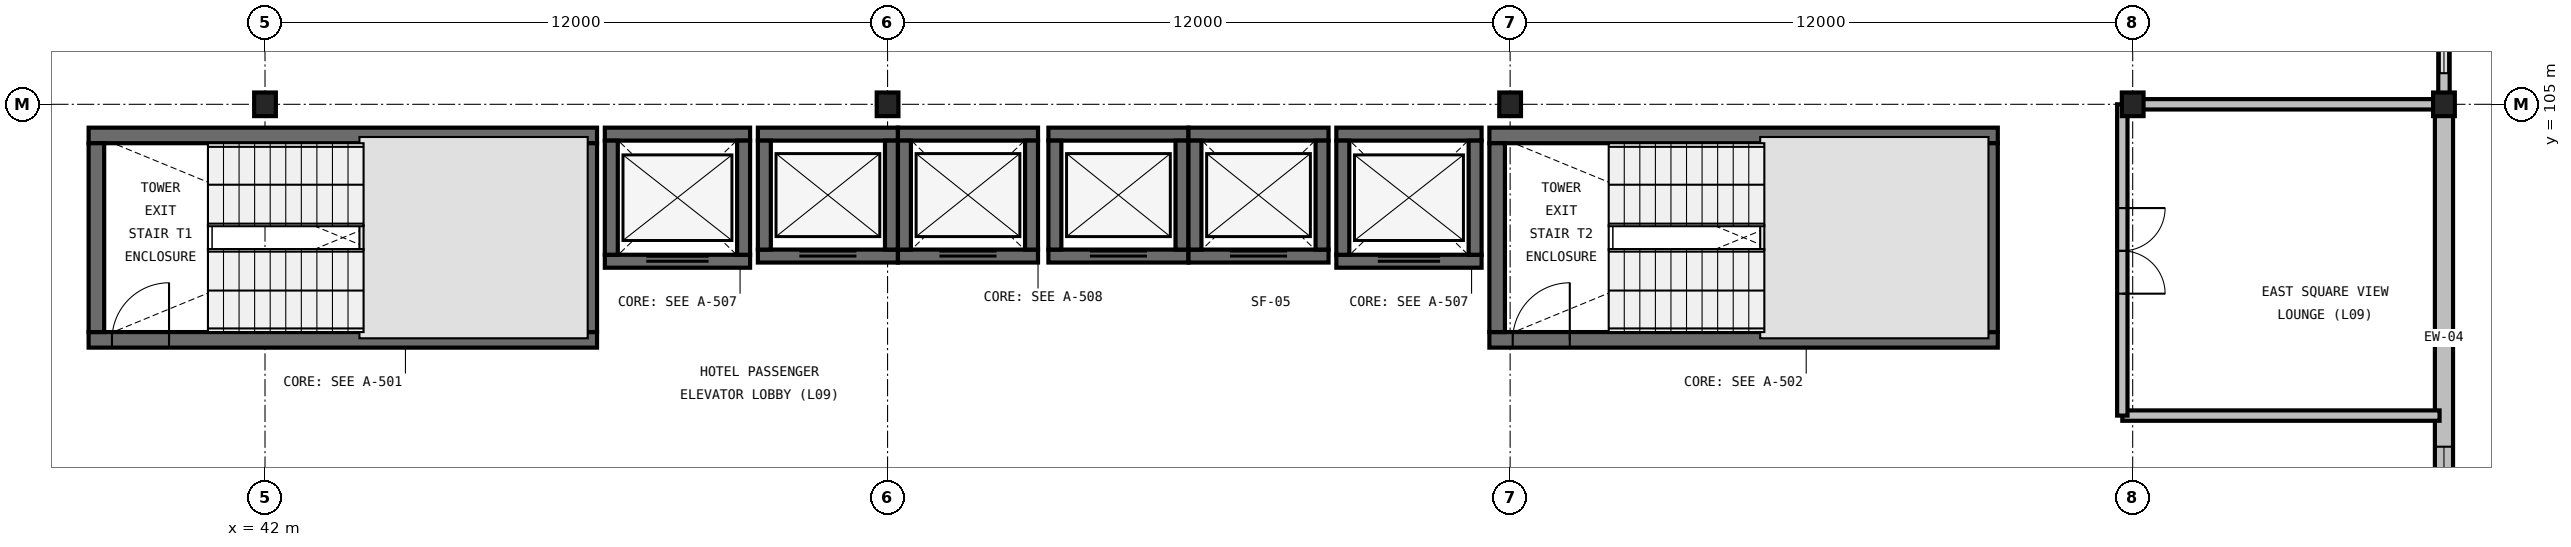
"""IFC4 building model, lengths in metres.
Left out: names, types, materials, properties, quantities, classifications, styles, units other than length and angle.
Written with IfcOpenShell. Run it as: python <this file> out.ifc"""

import sys

from ifc_helpers import new_model, si_unit, direction, frame, frame_2d, origin, origin_2d, place, context, subcontext, project, spatial, rectangle, i_section, extrude, element, fill, save


model = new_model("IFC4")
c1 = context("Model", 3, precision=1e-05, world=origin(), true_north=direction((0.0, 1.0)))
c2 = subcontext(c1, "Body", "Model", "MODEL_VIEW")
j1 = project(units=[si_unit("LENGTHUNIT", "METRE"), si_unit("PLANEANGLEUNIT", "RADIAN")], contexts=[c1])
p1 = place(None, origin())
s1 = spatial("IfcSite", under=j1, at=p1, CompositionType="ELEMENT")
p2 = place(p1, origin())
s2 = spatial("IfcBuilding", under=s1, at=p2, CompositionType="ELEMENT")
p3 = place(p2, frame((0.0, 0.0, 42.0)))
s3 = spatial("IfcBuildingStorey", under=s2, at=p3, CompositionType="ELEMENT", Elevation=42.0)
for number, where, z_axis, x_axis in (
    (1, (42.0, 105.0, 0.0), (0.0, 0.0, 1.0), (1.0, 0.0, 0.0)),
    (2, (54.0, 105.0, 0.0), (0.0, 0.0, 1.0), (1.0, 0.0, 0.0)),
    (3, (66.0, 105.0, 0.0), (0.0, 0.0, 1.0), (1.0, 0.0, 0.0)),
    (4, (78.0, 105.0, 0.0), (0.0, 0.0, 1.0), (1.0, 0.0, 0.0)),
    (5, (84.0, 105.0, 0.0), (0.0, 0.0, 1.0), (1.0, 0.0, 0.0)),
):
    element("IfcColumn", number, at=place(p3, frame(where, z_axis=z_axis, x_axis=x_axis)), inside=s3, PredefinedType="COLUMN", context=c2, shape_type="SweptSolid", body=[
        extrude(i_section(OverallWidth=0.419, OverallDepth=0.455, WebThickness=0.042, FlangeThickness=0.068, FilletRadius=0.031, at=origin_2d()), origin(), (0.0, 0.0, 1.0), 3.6),
    ])
p4 = place(p3, frame((38.6, 100.46, 0.0), z_axis=(0.0, 0.0, 1.0), x_axis=(1.0, 0.0, 0.0)))
e6 = element("IfcWall", 6, at=p4, inside=s3, PredefinedType="SHEAR", context=c2, shape_type="SweptSolid", body=[
    extrude(rectangle(XDim=9.8, YDim=0.3, at=frame_2d((4.9, 0.0))), origin(), (0.0, 0.0, 1.0), 3.6),
])
p5 = place(p4, frame((0.45, 0.0, 0.0)))
e7 = element("IfcOpeningElement", 7, at=p5, cuts=e6, PredefinedType="OPENING", context=c2, shape_type="SweptSolid", body=[
    extrude(rectangle(XDim=1.1, YDim=2.2, at=frame_2d((0.55, 1.1))), frame((0.0, 0.165, 0.0), z_axis=(0.0, -1.0, 0.0), x_axis=(1.0, 0.0, 0.0)), (0.0, 0.0, 1.0), 0.33),
])
p6 = place(p3, frame((48.4, 104.4, 0.0), z_axis=(0.0, 0.0, 1.0), x_axis=(-1.0, 0.0, 0.0)))
e8 = element("IfcWall", 8, at=p6, inside=s3, PredefinedType="SHEAR", context=c2, shape_type="SweptSolid", body=[
    extrude(rectangle(XDim=9.8, YDim=0.3, at=frame_2d((4.9, 0.0))), origin(), (0.0, 0.0, 1.0), 3.6),
])
for number, where, z_axis, x_axis in (
    (9, (38.75, 104.25, 0.0), (0.0, 0.0, 1.0), (0.0, -1.0, 0.0)),
    (10, (48.25, 100.61, 0.0), (0.0, 0.0, 1.0), (0.0, 1.0, 0.0)),
):
    element("IfcWall", number, at=place(p3, frame(where, z_axis=z_axis, x_axis=x_axis)), inside=s3, PredefinedType="SHEAR", context=c2, shape_type="SweptSolid", body=[
        extrude(rectangle(XDim=3.64, YDim=0.3, at=frame_2d((1.82, 0.0))), origin(), (0.0, 0.0, 1.0), 3.6),
    ])
p7 = place(p3, frame((65.6, 100.46, 0.0), z_axis=(0.0, 0.0, 1.0), x_axis=(1.0, 0.0, 0.0)))
e11 = element("IfcWall", 11, at=p7, inside=s3, PredefinedType="SHEAR", context=c2, shape_type="SweptSolid", body=[
    extrude(rectangle(XDim=9.8, YDim=0.3, at=frame_2d((4.9, 0.0))), origin(), (0.0, 0.0, 1.0), 3.6),
])
p8 = place(p7, frame((0.45, 0.0, 0.0)))
e12 = element("IfcOpeningElement", 12, at=p8, cuts=e11, PredefinedType="OPENING", context=c2, shape_type="SweptSolid", body=[
    extrude(rectangle(XDim=1.1, YDim=2.2, at=frame_2d((0.55, 1.1))), frame((0.0, 0.165, 0.0), z_axis=(0.0, -1.0, 0.0), x_axis=(1.0, 0.0, 0.0)), (0.0, 0.0, 1.0), 0.33),
])
p9 = place(p3, frame((75.4, 104.4, 0.0), z_axis=(0.0, 0.0, 1.0), x_axis=(-1.0, 0.0, 0.0)))
e13 = element("IfcWall", 13, at=p9, inside=s3, PredefinedType="SHEAR", context=c2, shape_type="SweptSolid", body=[
    extrude(rectangle(XDim=9.8, YDim=0.3, at=frame_2d((4.9, 0.0))), origin(), (0.0, 0.0, 1.0), 3.6),
])
for number, where, z_axis, x_axis in (
    (14, (65.75, 104.25, 0.0), (0.0, 0.0, 1.0), (0.0, -1.0, 0.0)),
    (15, (75.25, 100.61, 0.0), (0.0, 0.0, 1.0), (0.0, 1.0, 0.0)),
):
    element("IfcWall", number, at=place(p3, frame(where, z_axis=z_axis, x_axis=x_axis)), inside=s3, PredefinedType="SHEAR", context=c2, shape_type="SweptSolid", body=[
        extrude(rectangle(XDim=3.64, YDim=0.3, at=frame_2d((1.82, 0.0))), origin(), (0.0, 0.0, 1.0), 3.6),
    ])
p10 = place(p3, frame((48.55, 101.975, 0.0), z_axis=(0.0, 0.0, 1.0), x_axis=(1.0, 0.0, 0.0)))
e16 = element("IfcWall", 16, at=p10, inside=s3, PredefinedType="SHEAR", context=c2, shape_type="SweptSolid", body=[
    extrude(rectangle(XDim=2.8, YDim=0.25, at=frame_2d((1.4, 0.0))), origin(), (0.0, 0.0, 1.0), 3.6),
])
p11 = place(p10, frame((0.8, 0.0, 0.0)))
e17 = element("IfcOpeningElement", 17, at=p11, cuts=e16, PredefinedType="OPENING", context=c2, shape_type="SweptSolid", body=[
    extrude(rectangle(XDim=1.2, YDim=2.2, at=frame_2d((0.6, 1.1))), frame((0.0, 0.14, 0.0), z_axis=(0.0, -1.0, 0.0), x_axis=(1.0, 0.0, 0.0)), (0.0, 0.0, 1.0), 0.28),
])
p12 = place(p3, frame((51.35, 104.425, 0.0), z_axis=(0.0, 0.0, 1.0), x_axis=(-1.0, 0.0, 0.0)))
e18 = element("IfcWall", 18, at=p12, inside=s3, PredefinedType="SHEAR", context=c2, shape_type="SweptSolid", body=[
    extrude(rectangle(XDim=2.8, YDim=0.25, at=frame_2d((1.4, 0.0))), origin(), (0.0, 0.0, 1.0), 3.6),
])
for number, where, z_axis, x_axis in (
    (19, (48.675, 104.3, 0.0), (0.0, 0.0, 1.0), (0.0, -1.0, 0.0)),
    (20, (51.225, 102.1, 0.0), (0.0, 0.0, 1.0), (0.0, 1.0, 0.0)),
):
    element("IfcWall", number, at=place(p3, frame(where, z_axis=z_axis, x_axis=x_axis)), inside=s3, PredefinedType="SHEAR", context=c2, shape_type="SweptSolid", body=[
        extrude(rectangle(XDim=2.2, YDim=0.25, at=frame_2d((1.1, 0.0))), origin(), (0.0, 0.0, 1.0), 3.6),
    ])
p13 = place(p3, frame((62.65, 101.975, 0.0), z_axis=(0.0, 0.0, 1.0), x_axis=(1.0, 0.0, 0.0)))
e21 = element("IfcWall", 21, at=p13, inside=s3, PredefinedType="SHEAR", context=c2, shape_type="SweptSolid", body=[
    extrude(rectangle(XDim=2.8, YDim=0.25, at=frame_2d((1.4, 0.0))), origin(), (0.0, 0.0, 1.0), 3.6),
])
p14 = place(p13, frame((0.8, 0.0, 0.0)))
e22 = element("IfcOpeningElement", 22, at=p14, cuts=e21, PredefinedType="OPENING", context=c2, shape_type="SweptSolid", body=[
    extrude(rectangle(XDim=1.2, YDim=2.2, at=frame_2d((0.6, 1.1))), frame((0.0, 0.14, 0.0), z_axis=(0.0, -1.0, 0.0), x_axis=(1.0, 0.0, 0.0)), (0.0, 0.0, 1.0), 0.28),
])
p15 = place(p3, frame((65.45, 104.425, 0.0), z_axis=(0.0, 0.0, 1.0), x_axis=(-1.0, 0.0, 0.0)))
e23 = element("IfcWall", 23, at=p15, inside=s3, PredefinedType="SHEAR", context=c2, shape_type="SweptSolid", body=[
    extrude(rectangle(XDim=2.8, YDim=0.25, at=frame_2d((1.4, 0.0))), origin(), (0.0, 0.0, 1.0), 3.6),
])
for number, where, z_axis, x_axis in (
    (24, (62.775, 104.3, 0.0), (0.0, 0.0, 1.0), (0.0, -1.0, 0.0)),
    (25, (65.325, 102.1, 0.0), (0.0, 0.0, 1.0), (0.0, 1.0, 0.0)),
):
    element("IfcWall", number, at=place(p3, frame(where, z_axis=z_axis, x_axis=x_axis)), inside=s3, PredefinedType="SHEAR", context=c2, shape_type="SweptSolid", body=[
        extrude(rectangle(XDim=2.2, YDim=0.25, at=frame_2d((1.1, 0.0))), origin(), (0.0, 0.0, 1.0), 3.6),
    ])
p16 = place(p3, frame((51.5, 102.075, 0.0), z_axis=(0.0, 0.0, 1.0), x_axis=(1.0, 0.0, 0.0)))
e26 = element("IfcWall", 26, at=p16, inside=s3, PredefinedType="SHEAR", context=c2, shape_type="SweptSolid", body=[
    extrude(rectangle(XDim=2.7, YDim=0.25, at=frame_2d((1.35, 0.0))), origin(), (0.0, 0.0, 1.0), 3.6),
])
p17 = place(p16, frame((0.8, 0.0, 0.0)))
e27 = element("IfcOpeningElement", 27, at=p17, cuts=e26, PredefinedType="OPENING", context=c2, shape_type="SweptSolid", body=[
    extrude(rectangle(XDim=1.1, YDim=2.2, at=frame_2d((0.55, 1.1))), frame((0.0, 0.14, 0.0), z_axis=(0.0, -1.0, 0.0), x_axis=(1.0, 0.0, 0.0)), (0.0, 0.0, 1.0), 0.28),
])
p18 = place(p3, frame((54.2, 104.425, 0.0), z_axis=(0.0, 0.0, 1.0), x_axis=(-1.0, 0.0, 0.0)))
e28 = element("IfcWall", 28, at=p18, inside=s3, PredefinedType="SHEAR", context=c2, shape_type="SweptSolid", body=[
    extrude(rectangle(XDim=2.7, YDim=0.25, at=frame_2d((1.35, 0.0))), origin(), (0.0, 0.0, 1.0), 3.6),
])
for number, where, z_axis, x_axis in (
    (29, (51.625, 104.3, 0.0), (0.0, 0.0, 1.0), (0.0, -1.0, 0.0)),
    (30, (54.075, 102.2, 0.0), (0.0, 0.0, 1.0), (0.0, 1.0, 0.0)),
):
    element("IfcWall", number, at=place(p3, frame(where, z_axis=z_axis, x_axis=x_axis)), inside=s3, PredefinedType="SHEAR", context=c2, shape_type="SweptSolid", body=[
        extrude(rectangle(XDim=2.1, YDim=0.25, at=frame_2d((1.05, 0.0))), origin(), (0.0, 0.0, 1.0), 3.6),
    ])
p19 = place(p3, frame((54.2, 102.075, 0.0), z_axis=(0.0, 0.0, 1.0), x_axis=(1.0, 0.0, 0.0)))
e31 = element("IfcWall", 31, at=p19, inside=s3, PredefinedType="SHEAR", context=c2, shape_type="SweptSolid", body=[
    extrude(rectangle(XDim=2.7, YDim=0.25, at=frame_2d((1.35, 0.0))), origin(), (0.0, 0.0, 1.0), 3.6),
])
p20 = place(p19, frame((0.8, 0.0, 0.0)))
e32 = element("IfcOpeningElement", 32, at=p20, cuts=e31, PredefinedType="OPENING", context=c2, shape_type="SweptSolid", body=[
    extrude(rectangle(XDim=1.1, YDim=2.2, at=frame_2d((0.55, 1.1))), frame((0.0, 0.14, 0.0), z_axis=(0.0, -1.0, 0.0), x_axis=(1.0, 0.0, 0.0)), (0.0, 0.0, 1.0), 0.28),
])
p21 = place(p3, frame((56.9, 104.425, 0.0), z_axis=(0.0, 0.0, 1.0), x_axis=(-1.0, 0.0, 0.0)))
e33 = element("IfcWall", 33, at=p21, inside=s3, PredefinedType="SHEAR", context=c2, shape_type="SweptSolid", body=[
    extrude(rectangle(XDim=2.7, YDim=0.25, at=frame_2d((1.35, 0.0))), origin(), (0.0, 0.0, 1.0), 3.6),
])
for number, where, z_axis, x_axis in (
    (34, (54.325, 104.3, 0.0), (0.0, 0.0, 1.0), (0.0, -1.0, 0.0)),
    (35, (56.775, 102.2, 0.0), (0.0, 0.0, 1.0), (0.0, 1.0, 0.0)),
):
    element("IfcWall", number, at=place(p3, frame(where, z_axis=z_axis, x_axis=x_axis)), inside=s3, PredefinedType="SHEAR", context=c2, shape_type="SweptSolid", body=[
        extrude(rectangle(XDim=2.1, YDim=0.25, at=frame_2d((1.05, 0.0))), origin(), (0.0, 0.0, 1.0), 3.6),
    ])
p22 = place(p3, frame((57.1, 102.075, 0.0), z_axis=(0.0, 0.0, 1.0), x_axis=(1.0, 0.0, 0.0)))
e36 = element("IfcWall", 36, at=p22, inside=s3, PredefinedType="SHEAR", context=c2, shape_type="SweptSolid", body=[
    extrude(rectangle(XDim=2.7, YDim=0.25, at=frame_2d((1.35, 0.0))), origin(), (0.0, 0.0, 1.0), 3.6),
])
p23 = place(p22, frame((0.8, 0.0, 0.0)))
e37 = element("IfcOpeningElement", 37, at=p23, cuts=e36, PredefinedType="OPENING", context=c2, shape_type="SweptSolid", body=[
    extrude(rectangle(XDim=1.1, YDim=2.2, at=frame_2d((0.55, 1.1))), frame((0.0, 0.14, 0.0), z_axis=(0.0, -1.0, 0.0), x_axis=(1.0, 0.0, 0.0)), (0.0, 0.0, 1.0), 0.28),
])
p24 = place(p3, frame((59.8, 104.425, 0.0), z_axis=(0.0, 0.0, 1.0), x_axis=(-1.0, 0.0, 0.0)))
e38 = element("IfcWall", 38, at=p24, inside=s3, PredefinedType="SHEAR", context=c2, shape_type="SweptSolid", body=[
    extrude(rectangle(XDim=2.7, YDim=0.25, at=frame_2d((1.35, 0.0))), origin(), (0.0, 0.0, 1.0), 3.6),
])
for number, where, z_axis, x_axis in (
    (39, (57.225, 104.3, 0.0), (0.0, 0.0, 1.0), (0.0, -1.0, 0.0)),
    (40, (59.675, 102.2, 0.0), (0.0, 0.0, 1.0), (0.0, 1.0, 0.0)),
):
    element("IfcWall", number, at=place(p3, frame(where, z_axis=z_axis, x_axis=x_axis)), inside=s3, PredefinedType="SHEAR", context=c2, shape_type="SweptSolid", body=[
        extrude(rectangle(XDim=2.1, YDim=0.25, at=frame_2d((1.05, 0.0))), origin(), (0.0, 0.0, 1.0), 3.6),
    ])
p25 = place(p3, frame((59.8, 102.075, 0.0), z_axis=(0.0, 0.0, 1.0), x_axis=(1.0, 0.0, 0.0)))
e41 = element("IfcWall", 41, at=p25, inside=s3, PredefinedType="SHEAR", context=c2, shape_type="SweptSolid", body=[
    extrude(rectangle(XDim=2.7, YDim=0.25, at=frame_2d((1.35, 0.0))), origin(), (0.0, 0.0, 1.0), 3.6),
])
p26 = place(p25, frame((0.8, 0.0, 0.0)))
e42 = element("IfcOpeningElement", 42, at=p26, cuts=e41, PredefinedType="OPENING", context=c2, shape_type="SweptSolid", body=[
    extrude(rectangle(XDim=1.1, YDim=2.2, at=frame_2d((0.55, 1.1))), frame((0.0, 0.14, 0.0), z_axis=(0.0, -1.0, 0.0), x_axis=(1.0, 0.0, 0.0)), (0.0, 0.0, 1.0), 0.28),
])
p27 = place(p3, frame((62.5, 104.425, 0.0), z_axis=(0.0, 0.0, 1.0), x_axis=(-1.0, 0.0, 0.0)))
e43 = element("IfcWall", 43, at=p27, inside=s3, PredefinedType="SHEAR", context=c2, shape_type="SweptSolid", body=[
    extrude(rectangle(XDim=2.7, YDim=0.25, at=frame_2d((1.35, 0.0))), origin(), (0.0, 0.0, 1.0), 3.6),
])
for number, where, z_axis, x_axis in (
    (44, (59.925, 104.3, 0.0), (0.0, 0.0, 1.0), (0.0, -1.0, 0.0)),
    (45, (62.375, 102.2, 0.0), (0.0, 0.0, 1.0), (0.0, 1.0, 0.0)),
):
    element("IfcWall", number, at=place(p3, frame(where, z_axis=z_axis, x_axis=x_axis)), inside=s3, PredefinedType="SHEAR", context=c2, shape_type="SweptSolid", body=[
        extrude(rectangle(XDim=2.1, YDim=0.25, at=frame_2d((1.05, 0.0))), origin(), (0.0, 0.0, 1.0), 3.6),
    ])
p28 = place(p3, frame((84.0, 96.0, 0.0), z_axis=(0.0, 0.0, 1.0), x_axis=(0.0, 1.0, 0.0)))
e46 = element("IfcWall", 46, at=p28, inside=s3, PredefinedType="STANDARD", context=c2, shape_type="SweptSolid", body=[
    extrude(rectangle(XDim=9.0, YDim=0.35, at=frame_2d((4.5, 0.0))), origin(), (0.0, 0.0, 1.0), 2.981),
])
p29 = place(p28, frame((0.6, 0.0, 0.85)))
e47 = element("IfcOpeningElement", 47, at=p29, cuts=e46, PredefinedType="OPENING", context=c2, shape_type="SweptSolid", body=[
    extrude(rectangle(XDim=1.8, YDim=1.5, at=frame_2d((0.9, 0.75))), frame((0.0, 0.19, 0.0), z_axis=(0.0, -1.0, 0.0), x_axis=(1.0, 0.0, 0.0)), (0.0, 0.0, 1.0), 0.38),
])
p30 = place(p3, frame((84.0, 105.0, 0.0), z_axis=(0.0, 0.0, 1.0), x_axis=(0.0, 1.0, 0.0)))
e48 = element("IfcWall", 48, at=p30, inside=s3, PredefinedType="PARAPET", context=c2, shape_type="SweptSolid", body=[
    extrude(rectangle(XDim=12.0, YDim=0.22, at=frame_2d((6.0, 0.0))), origin(), (0.0, 0.0, 1.0), 0.2),
])
p31 = place(p3, frame((77.8, 99.0, 0.0), z_axis=(0.0, 0.0, 1.0), x_axis=(1.0, 0.0, 0.0)))
e49 = element("IfcWall", 49, at=p31, inside=s3, PredefinedType="PARTITIONING", context=c2, shape_type="SweptSolid", body=[
    extrude(rectangle(XDim=6.115, YDim=0.2, at=frame_2d((3.057, 0.0))), origin(), (0.0, 0.0, 1.0), 3.29),
])
p32 = place(p3, frame((83.915, 105.0, 0.0), z_axis=(0.0, 0.0, 1.0), x_axis=(-1.0, 0.0, 0.0)))
e50 = element("IfcWall", 50, at=p32, inside=s3, PredefinedType="PARTITIONING", context=c2, shape_type="SweptSolid", body=[
    extrude(rectangle(XDim=6.115, YDim=0.2, at=frame_2d((3.057, 0.0))), origin(), (0.0, 0.0, 1.0), 2.736),
])
p33 = place(p3, frame((77.8, 105.0, 0.0), z_axis=(0.0, 0.0, 1.0), x_axis=(0.0, -1.0, 0.0)))
e51 = element("IfcWall", 51, at=p33, inside=s3, PredefinedType="PARTITIONING", context=c2, shape_type="SweptSolid", body=[
    extrude(rectangle(XDim=6.0, YDim=0.2, at=frame_2d((3.0, 0.0))), origin(), (0.0, 0.0, 1.0), 3.29),
])
p34 = place(p33, frame((2.0, 0.0, 0.0)))
e52 = element("IfcOpeningElement", 52, at=p34, cuts=e51, PredefinedType="OPENING", context=c2, shape_type="SweptSolid", body=[
    extrude(rectangle(XDim=1.65, YDim=2.25, at=frame_2d((0.825, 1.125))), frame((0.0, 0.115, 0.0), z_axis=(0.0, -1.0, 0.0), x_axis=(1.0, 0.0, 0.0)), (0.0, 0.0, 1.0), 0.23),
])
p35 = place(p5, origin())
e53 = element("IfcDoor", 53, at=p35, inside=s3, OperationType="SINGLE_SWING_RIGHT", PredefinedType="DOOR", context=c2, shape_type="SweptSolid", body=[
    extrude(rectangle(XDim=1.1, YDim=2.2, at=frame_2d((0.55, 1.1))), frame((0.0, 0.025, 0.0), z_axis=(0.0, -1.0, 0.0), x_axis=(1.0, 0.0, 0.0)), (0.0, 0.0, 1.0), 0.05),
])
fill(e7, e53)
p36 = place(p8, origin())
e54 = element("IfcDoor", 54, at=p36, inside=s3, OperationType="SINGLE_SWING_RIGHT", PredefinedType="DOOR", context=c2, shape_type="SweptSolid", body=[
    extrude(rectangle(XDim=1.1, YDim=2.2, at=frame_2d((0.55, 1.1))), frame((0.0, 0.025, 0.0), z_axis=(0.0, -1.0, 0.0), x_axis=(1.0, 0.0, 0.0)), (0.0, 0.0, 1.0), 0.05),
])
fill(e12, e54)
p37 = place(p11, origin())
e55 = element("IfcDoor", 55, at=p37, inside=s3, OperationType="DOUBLE_DOOR_SLIDING", PredefinedType="DOOR", context=c2, shape_type="SweptSolid", body=[
    extrude(rectangle(XDim=1.2, YDim=2.2, at=frame_2d((0.6, 1.1))), frame((0.0, 0.025, 0.0), z_axis=(0.0, -1.0, 0.0), x_axis=(1.0, 0.0, 0.0)), (0.0, 0.0, 1.0), 0.05),
])
fill(e17, e55)
p38 = place(p14, origin())
e56 = element("IfcDoor", 56, at=p38, inside=s3, OperationType="DOUBLE_DOOR_SLIDING", PredefinedType="DOOR", context=c2, shape_type="SweptSolid", body=[
    extrude(rectangle(XDim=1.2, YDim=2.2, at=frame_2d((0.6, 1.1))), frame((0.0, 0.025, 0.0), z_axis=(0.0, -1.0, 0.0), x_axis=(1.0, 0.0, 0.0)), (0.0, 0.0, 1.0), 0.05),
])
fill(e22, e56)
p39 = place(p17, origin())
e57 = element("IfcDoor", 57, at=p39, inside=s3, OperationType="DOUBLE_DOOR_SLIDING", PredefinedType="DOOR", context=c2, shape_type="SweptSolid", body=[
    extrude(rectangle(XDim=1.1, YDim=2.2, at=frame_2d((0.55, 1.1))), frame((0.0, 0.025, 0.0), z_axis=(0.0, -1.0, 0.0), x_axis=(1.0, 0.0, 0.0)), (0.0, 0.0, 1.0), 0.05),
])
fill(e27, e57)
p40 = place(p20, origin())
e58 = element("IfcDoor", 58, at=p40, inside=s3, OperationType="DOUBLE_DOOR_SLIDING", PredefinedType="DOOR", context=c2, shape_type="SweptSolid", body=[
    extrude(rectangle(XDim=1.1, YDim=2.2, at=frame_2d((0.55, 1.1))), frame((0.0, 0.025, 0.0), z_axis=(0.0, -1.0, 0.0), x_axis=(1.0, 0.0, 0.0)), (0.0, 0.0, 1.0), 0.05),
])
fill(e32, e58)
p41 = place(p23, origin())
e59 = element("IfcDoor", 59, at=p41, inside=s3, OperationType="DOUBLE_DOOR_SLIDING", PredefinedType="DOOR", context=c2, shape_type="SweptSolid", body=[
    extrude(rectangle(XDim=1.1, YDim=2.2, at=frame_2d((0.55, 1.1))), frame((0.0, 0.025, 0.0), z_axis=(0.0, -1.0, 0.0), x_axis=(1.0, 0.0, 0.0)), (0.0, 0.0, 1.0), 0.05),
])
fill(e37, e59)
p42 = place(p26, origin())
e60 = element("IfcDoor", 60, at=p42, inside=s3, OperationType="DOUBLE_DOOR_SLIDING", PredefinedType="DOOR", context=c2, shape_type="SweptSolid", body=[
    extrude(rectangle(XDim=1.1, YDim=2.2, at=frame_2d((0.55, 1.1))), frame((0.0, 0.025, 0.0), z_axis=(0.0, -1.0, 0.0), x_axis=(1.0, 0.0, 0.0)), (0.0, 0.0, 1.0), 0.05),
])
fill(e42, e60)
p43 = place(p29, origin())
e61 = element("IfcWindow", 61, at=p43, inside=s3, PartitioningType="SINGLE_PANEL", PredefinedType="WINDOW", context=c2, shape_type="SweptSolid", body=[
    extrude(rectangle(XDim=1.8, YDim=1.5, at=frame_2d((0.9, 0.75))), frame((0.0, 0.03, 0.0), z_axis=(0.0, -1.0, 0.0), x_axis=(1.0, 0.0, 0.0)), (0.0, 0.0, 1.0), 0.06),
])
fill(e47, e61)
p44 = place(p34, origin())
e62 = element("IfcDoor", 62, at=p44, inside=s3, OperationType="DOUBLE_DOOR_SINGLE_SWING", PredefinedType="DOOR", context=c2, shape_type="SweptSolid", body=[
    extrude(rectangle(XDim=1.65, YDim=2.25, at=frame_2d((0.825, 1.125))), frame((0.0, 0.025, 0.0), z_axis=(0.0, -1.0, 0.0), x_axis=(1.0, 0.0, 0.0)), (0.0, 0.0, 1.0), 0.05),
])
fill(e52, e62)
save(model, sys.argv[1])
